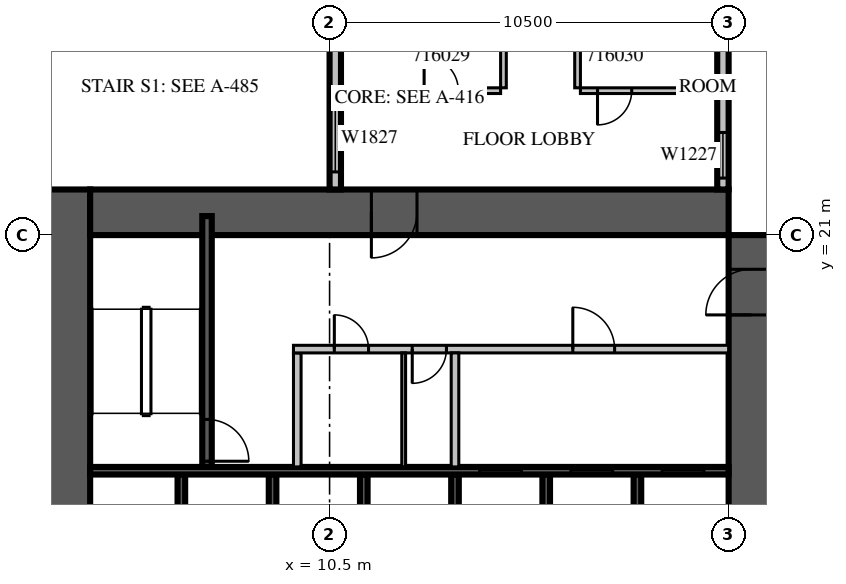
"""IFC4 building model, lengths in metres.
Left out: names, types, materials, properties, quantities, classifications, styles, units other than length and angle.
Written with IfcOpenShell. Run it as: python <this file> out.ifc"""

import sys

from ifc_helpers import new_model, si_unit, direction, frame, frame_2d, origin, place, context, subcontext, project, spatial, rectangle, extrude, source, transform, mapped, element, fill, save


model = new_model("IFC4")
c1 = context("Model", 3, precision=1e-05, world=origin(), true_north=direction((0.0, 1.0)))
c2 = subcontext(c1, "Body", "Model", "MODEL_VIEW")
j1 = project(units=[si_unit("LENGTHUNIT", "METRE"), si_unit("PLANEANGLEUNIT", "RADIAN")], contexts=[c1])
p1 = place(None, origin())
s1 = spatial("IfcSite", under=j1, at=p1, CompositionType="ELEMENT")
p2 = place(p1, origin())
s2 = spatial("IfcBuilding", under=s1, at=p2, CompositionType="ELEMENT")
p3 = place(p2, frame((0.0, 0.0, 78.3)))
s3 = spatial("IfcBuildingStorey", under=s2, at=p3, CompositionType="ELEMENT", Elevation=78.3)
m1 = source(origin(), c2, "Body", "SweptSolid", [
    extrude(rectangle(XDim=18.0, YDim=1.2, at=frame_2d((9.0, 0.0))), origin(), (0.0, 0.0, 1.0), 4.2),
])
p4 = place(p3, frame((3.6, 4.2, 0.0), z_axis=(0.0, 0.0, 1.0), x_axis=(0.0, 1.0, 0.0)))
e1 = element("IfcWall", 1, at=p4, inside=s3, PredefinedType="SHEAR", context=c2, shape_type="MappedRepresentation", body=[
    mapped(m1, transform((0.0, 0.0, 0.0), scale=1.0)),
])
m2 = source(origin(), c2, "Body", "SweptSolid", [
    extrude(rectangle(XDim=2.2, YDim=2.1, at=frame_2d((1.1, 1.05))), frame((0.0, 0.61, 0.0), z_axis=(0.0, -1.0, 0.0), x_axis=(1.0, 0.0, 0.0)), (0.0, 0.0, 1.0), 1.22),
])
p5 = place(p4, frame((4.2, 0.0, 0.0)))
e2 = element("IfcOpeningElement", 2, at=p5, cuts=e1, PredefinedType="OPENING", context=c2, shape_type="MappedRepresentation", body=[
    mapped(m2, transform((0.0, 0.0, 0.0), scale=1.0)),
])
m3 = source(origin(), c2, "Body", "SweptSolid", [
    extrude(rectangle(XDim=16.8, YDim=1.2, at=frame_2d((8.4, 0.0))), origin(), (0.0, 0.0, 1.0), 4.2),
])
p6 = place(p3, frame((21.6, 4.2, 0.0), z_axis=(0.0, 0.0, 1.0), x_axis=(0.0, 1.0, 0.0)))
e3 = element("IfcWall", 3, at=p6, inside=s3, PredefinedType="SHEAR", context=c2, shape_type="MappedRepresentation", body=[
    mapped(m3, transform((0.0, 0.0, 0.0), scale=1.0)),
])
p7 = place(p6, frame((4.2, 0.0, 0.0)))
e4 = element("IfcOpeningElement", 4, at=p7, cuts=e3, PredefinedType="OPENING", context=c2, shape_type="MappedRepresentation", body=[
    mapped(m2, transform((0.0, 0.0, 0.0), scale=1.0)),
])
m4 = source(origin(), c2, "Body", "SweptSolid", [
    extrude(rectangle(XDim=1.2, YDim=2.1, at=frame_2d((0.6, 1.05))), frame((0.0, 0.61, 0.0), z_axis=(0.0, -1.0, 0.0), x_axis=(1.0, 0.0, 0.0)), (0.0, 0.0, 1.0), 1.22),
])
p8 = place(p6, frame((14.7, 0.0, 0.0)))
e5 = element("IfcOpeningElement", 5, at=p8, cuts=e3, PredefinedType="OPENING", context=c2, shape_type="MappedRepresentation", body=[
    mapped(m4, transform((0.0, 0.0, 0.0), scale=1.0)),
])
p9 = place(p3, frame((4.2, 21.6, 0.0), z_axis=(0.0, 0.0, 1.0), x_axis=(1.0, 0.0, 0.0)))
e6 = element("IfcWall", 6, at=p9, inside=s3, PredefinedType="SHEAR", context=c2, shape_type="MappedRepresentation", body=[
    mapped(m3, transform((0.0, 0.0, 0.0), scale=1.0)),
])
p10 = place(p9, frame((7.4, 0.0, 0.0)))
e7 = element("IfcOpeningElement", 7, at=p10, cuts=e6, PredefinedType="OPENING", context=c2, shape_type="MappedRepresentation", body=[
    mapped(m4, transform((0.0, 0.0, 0.0), scale=1.0)),
])
m5 = source(origin(), c2, "Body", "SweptSolid", [
    extrude(rectangle(XDim=6.6, YDim=0.3, at=frame_2d((3.3, 0.0))), origin(), (0.0, 0.0, 1.0), 3.8),
])
p11 = place(p3, frame((20.85, 22.2, 0.0), z_axis=(0.0, 0.0, 1.0), x_axis=(0.0, 1.0, 0.0)))
e8 = element("IfcWall", 8, at=p11, inside=s3, PredefinedType="STANDARD", context=c2, shape_type="MappedRepresentation", body=[
    mapped(m5, transform((0.0, 0.0, 0.0), scale=1.0)),
])
m6 = source(origin(), c2, "Body", "SweptSolid", [
    extrude(rectangle(XDim=1.2, YDim=2.7, at=frame_2d((0.6, 1.35))), frame((0.0, 0.16, 0.0), z_axis=(0.0, -1.0, 0.0), x_axis=(1.0, 0.0, 0.0)), (0.0, 0.0, 1.0), 0.32),
])
p12 = place(p11, frame((0.3, 0.0, 0.6)))
e9 = element("IfcOpeningElement", 9, at=p12, cuts=e8, PredefinedType="OPENING", context=c2, shape_type="MappedRepresentation", body=[
    mapped(m6, transform((0.0, 0.0, 0.0), scale=1.0)),
])
m7 = source(origin(), c2, "Body", "SweptSolid", [
    extrude(rectangle(XDim=2.4, YDim=2.7, at=frame_2d((1.2, 1.35))), frame((0.0, 0.16, 0.0), z_axis=(0.0, -1.0, 0.0), x_axis=(1.0, 0.0, 0.0)), (0.0, 0.0, 1.0), 0.32),
])
p13 = place(p11, frame((3.9, 0.0, 0.6)))
e10 = element("IfcOpeningElement", 10, at=p13, cuts=e8, PredefinedType="OPENING", context=c2, shape_type="MappedRepresentation", body=[
    mapped(m7, transform((0.0, 0.0, 0.0), scale=1.0)),
])
p14 = place(p3, frame((10.65, 28.8, 0.0), z_axis=(0.0, 0.0, 1.0), x_axis=(0.0, -1.0, 0.0)))
e11 = element("IfcWall", 11, at=p14, inside=s3, PredefinedType="STANDARD", context=c2, shape_type="MappedRepresentation", body=[
    mapped(m5, transform((0.0, 0.0, 0.0), scale=1.0)),
])
p15 = place(p14, frame((0.3, 0.0, 0.6)))
e12 = element("IfcOpeningElement", 12, at=p15, cuts=e11, PredefinedType="OPENING", context=c2, shape_type="MappedRepresentation", body=[
    mapped(m6, transform((0.0, 0.0, 0.0), scale=1.0)),
])
m8 = source(origin(), c2, "Body", "SweptSolid", [
    extrude(rectangle(XDim=1.8, YDim=2.7, at=frame_2d((0.9, 1.35))), frame((0.0, 0.16, 0.0), z_axis=(0.0, -1.0, 0.0), x_axis=(1.0, 0.0, 0.0)), (0.0, 0.0, 1.0), 0.32),
])
p16 = place(p14, frame((4.338, 0.0, 0.6)))
e13 = element("IfcOpeningElement", 13, at=p16, cuts=e11, PredefinedType="OPENING", context=c2, shape_type="MappedRepresentation", body=[
    mapped(m8, transform((0.0, 0.0, 0.0), scale=1.0)),
])
m9 = source(origin(), c2, "Body", "SweptSolid", [
    extrude(rectangle(XDim=3.0, YDim=0.2, at=frame_2d((1.5, 0.0))), origin(), (0.0, 0.0, 1.0), 4.2),
])
for number, where, z_axis, x_axis in (
    (14, (6.6, 11.7, 0.0), (0.0, 0.0, 1.0), (0.0, 1.0, 0.0)),
    (15, (9.0, 11.7, 0.0), (0.0, 0.0, 1.0), (0.0, 1.0, 0.0)),
    (16, (11.4, 11.7, 0.0), (0.0, 0.0, 1.0), (0.0, 1.0, 0.0)),
    (17, (13.8, 11.7, 0.0), (0.0, 0.0, 1.0), (0.0, 1.0, 0.0)),
    (18, (16.2, 11.7, 0.0), (0.0, 0.0, 1.0), (0.0, 1.0, 0.0)),
    (19, (18.6, 11.7, 0.0), (0.0, 0.0, 1.0), (0.0, 1.0, 0.0)),
):
    element("IfcWall", number, at=place(p3, frame(where, z_axis=z_axis, x_axis=x_axis)), inside=s3, PredefinedType="SOLIDWALL", context=c2, shape_type="MappedRepresentation", body=[
        mapped(m9, transform((0.0, 0.0, 0.0), scale=1.0)),
    ])
m10 = source(origin(), c2, "Body", "SweptSolid", [
    extrude(rectangle(XDim=16.8, YDim=0.2, at=frame_2d((8.4, 0.0))), origin(), (0.0, 0.0, 1.0), 4.2),
])
p17 = place(p3, frame((4.2, 14.8, 0.0), z_axis=(0.0, 0.0, 1.0), x_axis=(1.0, 0.0, 0.0)))
e20 = element("IfcWall", 20, at=p17, inside=s3, PredefinedType="SOLIDWALL", context=c2, shape_type="MappedRepresentation", body=[
    mapped(m10, transform((0.0, 0.0, 0.0), scale=1.0)),
])
m11 = source(origin(), c2, "Body", "SweptSolid", [
    extrude(rectangle(XDim=1.1, YDim=2.1, at=frame_2d((0.55, 1.05))), frame((0.0, 0.11, 0.0), z_axis=(0.0, -1.0, 0.0), x_axis=(1.0, 0.0, 0.0)), (0.0, 0.0, 1.0), 0.22),
])
p18 = place(p17, frame((10.25, 0.0, 0.0)))
e21 = element("IfcOpeningElement", 21, at=p18, cuts=e20, PredefinedType="OPENING", context=c2, shape_type="MappedRepresentation", body=[
    mapped(m11, transform((0.0, 0.0, 0.0), scale=1.0)),
])
p19 = place(p17, frame((12.65, 0.0, 0.0)))
e22 = element("IfcOpeningElement", 22, at=p19, cuts=e20, PredefinedType="OPENING", context=c2, shape_type="MappedRepresentation", body=[
    mapped(m11, transform((0.0, 0.0, 0.0), scale=1.0)),
])
p20 = place(p17, frame((15.05, 0.0, 0.0)))
e23 = element("IfcOpeningElement", 23, at=p20, cuts=e20, PredefinedType="OPENING", context=c2, shape_type="MappedRepresentation", body=[
    mapped(m11, transform((0.0, 0.0, 0.0), scale=1.0)),
])
m12 = source(origin(), c2, "Body", "SweptSolid", [
    extrude(rectangle(XDim=6.6, YDim=0.25, at=frame_2d((3.3, 0.0))), origin(), (0.0, 0.0, 1.0), 3.8),
])
p21 = place(p3, frame((7.275, 14.9, 0.0), z_axis=(0.0, 0.0, 1.0), x_axis=(0.0, 1.0, 0.0)))
e24 = element("IfcWall", 24, at=p21, inside=s3, PredefinedType="SOLIDWALL", context=c2, shape_type="MappedRepresentation", body=[
    mapped(m12, transform((0.0, 0.0, 0.0), scale=1.0)),
])
m13 = source(origin(), c2, "Body", "SweptSolid", [
    extrude(rectangle(XDim=1.1, YDim=2.1, at=frame_2d((0.55, 1.05))), frame((0.0, 0.135, 0.0), z_axis=(0.0, -1.0, 0.0), x_axis=(1.0, 0.0, 0.0)), (0.0, 0.0, 1.0), 0.27),
])
p22 = place(p21, frame((0.15, 0.0, 0.0)))
e25 = element("IfcOpeningElement", 25, at=p22, cuts=e24, PredefinedType="OPENING", context=c2, shape_type="MappedRepresentation", body=[
    mapped(m13, transform((0.0, 0.0, 0.0), scale=1.0)),
])
m14 = source(origin(), c2, "Body", "SweptSolid", [
    extrude(rectangle(XDim=3.0, YDim=0.2, at=frame_2d((1.5, 0.0))), origin(), (0.0, 0.0, 1.0), 3.8),
])
p23 = place(p3, frame((9.65, 14.9, 0.0), z_axis=(0.0, 0.0, 1.0), x_axis=(0.0, 1.0, 0.0)))
e26 = element("IfcWall", 26, at=p23, inside=s3, PredefinedType="PARTITIONING", context=c2, shape_type="MappedRepresentation", body=[
    mapped(m14, transform((0.0, 0.0, 0.0), scale=1.0)),
])
m15 = source(origin(), c2, "Body", "SweptSolid", [
    extrude(rectangle(XDim=11.45, YDim=0.2, at=frame_2d((5.725, 0.0))), origin(), (0.0, 0.0, 1.0), 3.8),
])
p24 = place(p3, frame((9.55, 18.0, 0.0), z_axis=(0.0, 0.0, 1.0), x_axis=(1.0, 0.0, 0.0)))
e27 = element("IfcWall", 27, at=p24, inside=s3, PredefinedType="PARTITIONING", context=c2, shape_type="MappedRepresentation", body=[
    mapped(m15, transform((0.0, 0.0, 0.0), scale=1.0)),
])
m16 = source(origin(), c2, "Body", "SweptSolid", [
    extrude(rectangle(XDim=0.9, YDim=2.1, at=frame_2d((0.45, 1.05))), frame((0.0, 0.11, 0.0), z_axis=(0.0, -1.0, 0.0), x_axis=(1.0, 0.0, 0.0)), (0.0, 0.0, 1.0), 0.22),
])
p25 = place(p24, frame((1.075, 0.0, 0.0)))
e28 = element("IfcOpeningElement", 28, at=p25, cuts=e27, PredefinedType="OPENING", context=c2, shape_type="MappedRepresentation", body=[
    mapped(m16, transform((0.0, 0.0, 0.0), scale=1.0)),
])
p26 = place(p24, frame((3.125, 0.0, 0.0)))
e29 = element("IfcOpeningElement", 29, at=p26, cuts=e27, PredefinedType="OPENING", context=c2, shape_type="MappedRepresentation", body=[
    mapped(m16, transform((0.0, 0.0, 0.0), scale=1.0)),
])
p27 = place(p24, frame((7.35, 0.0, 0.0)))
e30 = element("IfcOpeningElement", 30, at=p27, cuts=e27, PredefinedType="OPENING", context=c2, shape_type="MappedRepresentation", body=[
    mapped(m11, transform((0.0, 0.0, 0.0), scale=1.0)),
])
p28 = place(p3, frame((13.8, 14.9, 0.0), z_axis=(0.0, 0.0, 1.0), x_axis=(0.0, 1.0, 0.0)))
e31 = element("IfcWall", 31, at=p28, inside=s3, PredefinedType="PARTITIONING", context=c2, shape_type="MappedRepresentation", body=[
    mapped(m14, transform((0.0, 0.0, 0.0), scale=1.0)),
])
m17 = source(origin(), c2, "Body", "SweptSolid", [
    extrude(rectangle(XDim=3.0, YDim=0.1, at=frame_2d((1.5, 0.0))), origin(), (0.0, 0.0, 1.0), 3.8),
])
p29 = place(p3, frame((12.45, 14.9, 0.0), z_axis=(0.0, 0.0, 1.0), x_axis=(0.0, 1.0, 0.0)))
e32 = element("IfcWall", 32, at=p29, inside=s3, PredefinedType="PARTITIONING", context=c2, shape_type="MappedRepresentation", body=[
    mapped(m17, transform((0.0, 0.0, 0.0), scale=1.0)),
])
m18 = source(origin(), c2, "Body", "SweptSolid", [
    extrude(rectangle(XDim=4.295, YDim=0.15, at=frame_2d((2.147, 0.0))), origin(), (0.0, 0.0, 1.0), 3.8),
])
p30 = place(p3, frame((10.705, 24.8, 0.0), z_axis=(0.0, 0.0, 1.0), x_axis=(1.0, 0.0, 0.0)))
e33 = element("IfcWall", 33, at=p30, inside=s3, PredefinedType="PARTITIONING", context=c2, shape_type="MappedRepresentation", body=[
    mapped(m18, transform((0.0, 0.0, 0.0), scale=1.0)),
])
m19 = source(origin(), c2, "Body", "SweptSolid", [
    extrude(rectangle(XDim=0.9, YDim=2.1, at=frame_2d((0.45, 1.05))), frame((0.0, 0.085, 0.0), z_axis=(0.0, -1.0, 0.0), x_axis=(1.0, 0.0, 0.0)), (0.0, 0.0, 1.0), 0.17),
])
p31 = place(p30, frame((2.283, 0.0, 0.0)))
e34 = element("IfcOpeningElement", 34, at=p31, cuts=e33, PredefinedType="OPENING", context=c2, shape_type="MappedRepresentation", body=[
    mapped(m19, transform((0.0, 0.0, 0.0), scale=1.0)),
])
m20 = source(origin(), c2, "Body", "SweptSolid", [
    extrude(rectangle(XDim=3.6, YDim=0.15, at=frame_2d((1.8, 0.0))), origin(), (0.0, 0.0, 1.0), 3.8),
])
p32 = place(p3, frame((17.1, 24.8, 0.0), z_axis=(0.0, 0.0, 1.0), x_axis=(1.0, 0.0, 0.0)))
e35 = element("IfcWall", 35, at=p32, inside=s3, PredefinedType="PARTITIONING", context=c2, shape_type="MappedRepresentation", body=[
    mapped(m20, transform((0.0, 0.0, 0.0), scale=1.0)),
])
p33 = place(p32, frame((0.45, 0.0, 0.0)))
e36 = element("IfcOpeningElement", 36, at=p33, cuts=e35, PredefinedType="OPENING", context=c2, shape_type="MappedRepresentation", body=[
    mapped(m19, transform((0.0, 0.0, 0.0), scale=1.0)),
])
m21 = source(origin(), c2, "Body", "SweptSolid", [
    extrude(rectangle(XDim=4.45, YDim=0.15, at=frame_2d((2.225, 0.0))), origin(), (0.0, 0.0, 1.0), 3.8),
])
for number, where, z_axis, x_axis in (
    (37, (15.075, 24.875, 0.0), (0.0, 0.0, 1.0), (0.0, 1.0, 0.0)),
    (38, (17.025, 29.325, 0.0), (0.0, 0.0, 1.0), (0.0, -1.0, 0.0)),
):
    element("IfcWall", number, at=place(p3, frame(where, z_axis=z_axis, x_axis=x_axis)), inside=s3, PredefinedType="PARTITIONING", context=c2, shape_type="MappedRepresentation", body=[
        mapped(m21, transform((0.0, 0.0, 0.0), scale=1.0)),
    ])
m22 = source(origin(), c2, "Body", "SweptSolid", [
    extrude(rectangle(XDim=1.2, YDim=2.7, at=frame_2d((0.6, 1.35))), frame((0.0, 0.03, 0.0), z_axis=(0.0, -1.0, 0.0), x_axis=(1.0, 0.0, 0.0)), (0.0, 0.0, 1.0), 0.06),
])
p34 = place(p12, origin())
e39 = element("IfcWindow", 39, at=p34, inside=s3, PartitioningType="SINGLE_PANEL", PredefinedType="WINDOW", context=c2, shape_type="MappedRepresentation", body=[
    mapped(m22, transform((0.0, 0.0, 0.0), scale=1.0)),
])
fill(e9, e39)
m23 = source(origin(), c2, "Body", "SweptSolid", [
    extrude(rectangle(XDim=1.8, YDim=2.7, at=frame_2d((0.9, 1.35))), frame((0.0, 0.03, 0.0), z_axis=(0.0, -1.0, 0.0), x_axis=(1.0, 0.0, 0.0)), (0.0, 0.0, 1.0), 0.06),
])
p35 = place(p16, origin())
e40 = element("IfcWindow", 40, at=p35, inside=s3, PartitioningType="SINGLE_PANEL", PredefinedType="WINDOW", context=c2, shape_type="MappedRepresentation", body=[
    mapped(m23, transform((0.0, 0.0, 0.0), scale=1.0)),
])
fill(e13, e40)
m24 = source(origin(), c2, "Body", "SweptSolid", [
    extrude(rectangle(XDim=1.1, YDim=2.1, at=frame_2d((0.55, 1.05))), frame((0.0, 0.025, 0.0), z_axis=(0.0, -1.0, 0.0), x_axis=(1.0, 0.0, 0.0)), (0.0, 0.0, 1.0), 0.05),
])
p36 = place(p18, origin())
e41 = element("IfcDoor", 41, at=p36, inside=s3, OperationType="SLIDING_TO_LEFT", PredefinedType="DOOR", context=c2, shape_type="MappedRepresentation", body=[
    mapped(m24, transform((0.0, 0.0, 0.0), scale=1.0)),
])
fill(e21, e41)
p37 = place(p19, origin())
e42 = element("IfcDoor", 42, at=p37, inside=s3, OperationType="SLIDING_TO_LEFT", PredefinedType="DOOR", context=c2, shape_type="MappedRepresentation", body=[
    mapped(m24, transform((0.0, 0.0, 0.0), scale=1.0)),
])
fill(e22, e42)
p38 = place(p20, origin())
e43 = element("IfcDoor", 43, at=p38, inside=s3, OperationType="SLIDING_TO_LEFT", PredefinedType="DOOR", context=c2, shape_type="MappedRepresentation", body=[
    mapped(m24, transform((0.0, 0.0, 0.0), scale=1.0)),
])
fill(e23, e43)
p39 = place(p22, origin())
e44 = element("IfcDoor", 44, at=p39, inside=s3, OperationType="SINGLE_SWING_RIGHT", PredefinedType="DOOR", context=c2, shape_type="MappedRepresentation", body=[
    mapped(m24, transform((0.0, 0.0, 0.0), scale=1.0)),
])
fill(e25, e44)
m25 = source(origin(), c2, "Body", "SweptSolid", [
    extrude(rectangle(XDim=0.9, YDim=2.1, at=frame_2d((0.45, 1.05))), frame((0.0, 0.025, 0.0), z_axis=(0.0, -1.0, 0.0), x_axis=(1.0, 0.0, 0.0)), (0.0, 0.0, 1.0), 0.05),
])
p40 = place(p25, origin())
e45 = element("IfcDoor", 45, at=p40, inside=s3, OperationType="SINGLE_SWING_LEFT", PredefinedType="DOOR", context=c2, shape_type="MappedRepresentation", body=[
    mapped(m25, transform((0.0, 0.0, 0.0), scale=1.0)),
])
fill(e28, e45)
p41 = place(p26, origin())
e46 = element("IfcDoor", 46, at=p41, inside=s3, OperationType="SINGLE_SWING_RIGHT", PredefinedType="DOOR", context=c2, shape_type="MappedRepresentation", body=[
    mapped(m25, transform((0.0, 0.0, 0.0), scale=1.0)),
])
fill(e29, e46)
p42 = place(p27, origin())
e47 = element("IfcDoor", 47, at=p42, inside=s3, OperationType="SINGLE_SWING_LEFT", PredefinedType="DOOR", context=c2, shape_type="MappedRepresentation", body=[
    mapped(m24, transform((0.0, 0.0, 0.0), scale=1.0)),
])
fill(e30, e47)
m26 = source(origin(), c2, "Body", "SweptSolid", [
    extrude(rectangle(XDim=1.2, YDim=2.1, at=frame_2d((0.6, 1.05))), frame((0.0, 0.025, 0.0), z_axis=(0.0, -1.0, 0.0), x_axis=(1.0, 0.0, 0.0)), (0.0, 0.0, 1.0), 0.05),
])
p43 = place(p10, origin())
e48 = element("IfcDoor", 48, at=p43, inside=s3, OperationType="SINGLE_SWING_RIGHT", PredefinedType="DOOR", context=c2, shape_type="MappedRepresentation", body=[
    mapped(m26, transform((0.0, 0.0, 0.0), scale=1.0)),
])
fill(e7, e48)
p44 = place(p8, origin())
e49 = element("IfcDoor", 49, at=p44, inside=s3, OperationType="SINGLE_SWING_LEFT", PredefinedType="DOOR", context=c2, shape_type="MappedRepresentation", body=[
    mapped(m26, transform((0.0, 0.0, 0.0), scale=1.0)),
])
fill(e5, e49)
p45 = place(p31, origin())
e50 = element("IfcDoor", 50, at=p45, inside=s3, OperationType="SINGLE_SWING_LEFT", PredefinedType="DOOR", context=c2, shape_type="MappedRepresentation", body=[
    mapped(m25, transform((0.0, 0.0, 0.0), scale=1.0)),
])
fill(e34, e50)
p46 = place(p33, origin())
e51 = element("IfcDoor", 51, at=p46, inside=s3, OperationType="SINGLE_SWING_RIGHT", PredefinedType="DOOR", context=c2, shape_type="MappedRepresentation", body=[
    mapped(m25, transform((0.0, 0.0, 0.0), scale=1.0)),
])
fill(e36, e51)
save(model, sys.argv[1])
